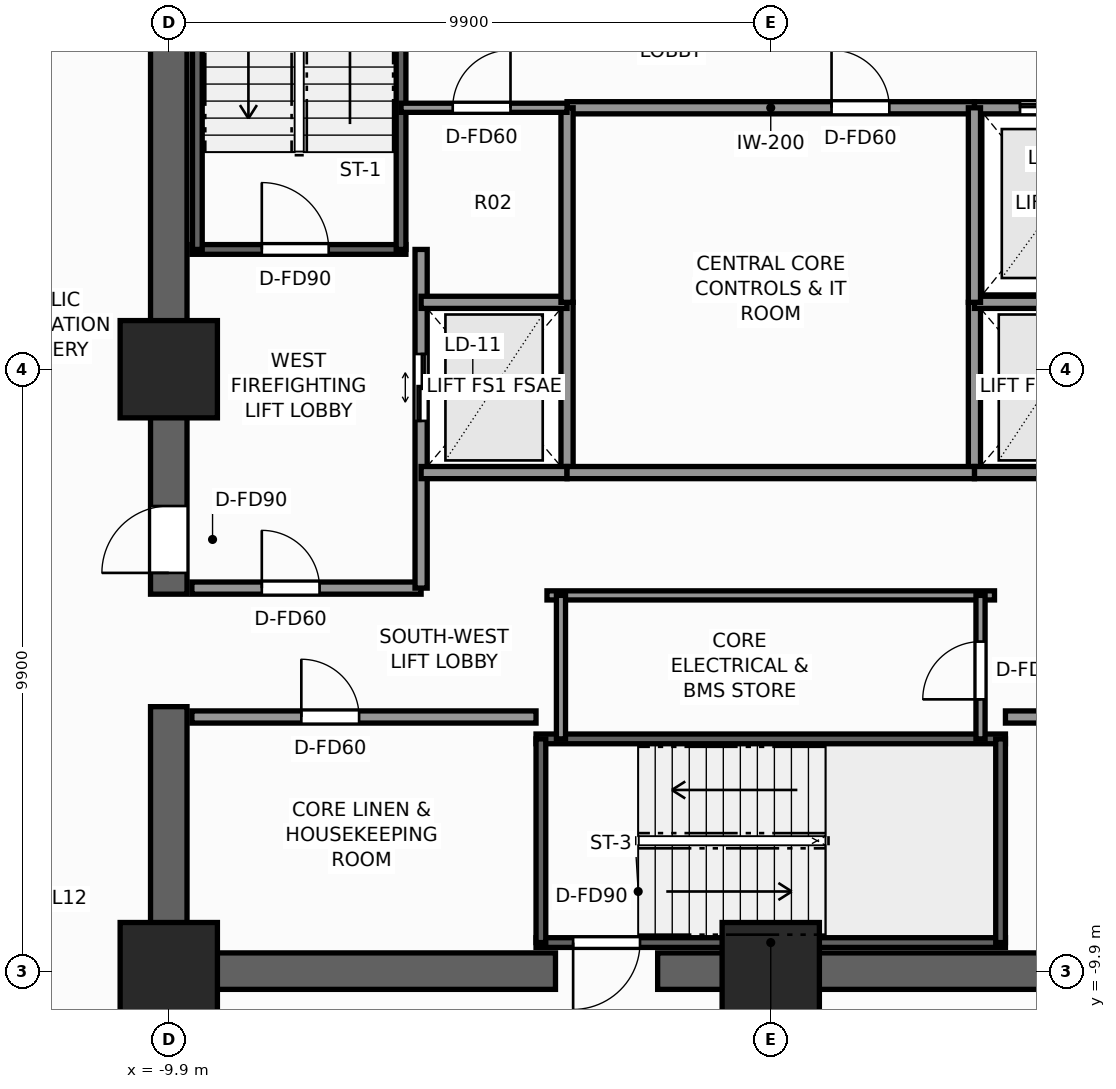
"""IFC4 building model, lengths in metres.
Left out: names, types, materials, properties, quantities, classifications, styles, units other than length and angle.
Written with IfcOpenShell. Run it as: python <this file> out.ifc"""

import sys

from ifc_helpers import new_model, si_unit, direction, frame, frame_2d, origin, origin_2d, place, context, subcontext, project, spatial, rectangle, extrude, element, fill, save


model = new_model("IFC4")
c1 = context("Model", 3, precision=1e-05, world=origin(), true_north=direction((0.0, 1.0)))
c2 = subcontext(c1, "Body", "Model", "MODEL_VIEW")
j1 = project(units=[si_unit("LENGTHUNIT", "METRE"), si_unit("PLANEANGLEUNIT", "RADIAN")], contexts=[c1])
p1 = place(None, origin())
s1 = spatial("IfcSite", under=j1, at=p1, CompositionType="ELEMENT")
p2 = place(p1, origin())
s2 = spatial("IfcBuilding", under=s1, at=p2, CompositionType="ELEMENT")
p3 = place(p2, frame((0.0, 0.0, 15.2)))
s3 = spatial("IfcBuildingStorey", under=s2, at=p3, CompositionType="ELEMENT", Elevation=15.2)
p4 = place(p3, frame((10.2, -9.9, 0.0), z_axis=(0.0, 0.0, 1.0), x_axis=(-1.0, 0.0, 0.0)))
e1 = element("IfcWall", 1, at=p4, inside=s3, PredefinedType="SHEAR", context=c2, shape_type="SweptSolid", body=[
    extrude(rectangle(XDim=12.06, YDim=0.6, at=frame_2d((6.03, 0.0))), origin(), (0.0, 0.0, 1.0), 4.1),
])
p5 = place(p3, frame((-3.54, -9.9, 0.0), z_axis=(0.0, 0.0, 1.0), x_axis=(-1.0, 0.0, 0.0)))
e2 = element("IfcWall", 2, at=p5, inside=s3, PredefinedType="SHEAR", context=c2, shape_type="SweptSolid", body=[
    extrude(rectangle(XDim=6.66, YDim=0.6, at=frame_2d((3.33, 0.0))), origin(), (0.0, 0.0, 1.0), 4.1),
])
p6 = place(p3, frame((-9.9, -9.6, 0.0), z_axis=(0.0, 0.0, 1.0), x_axis=(0.0, 1.0, 0.0)))
e3 = element("IfcWall", 3, at=p6, inside=s3, PredefinedType="SHEAR", context=c2, shape_type="SweptSolid", body=[
    extrude(rectangle(XDim=4.05, YDim=0.6, at=frame_2d((2.025, 0.0))), origin(), (0.0, 0.0, 1.0), 4.1),
])
p7 = place(p3, frame((-9.9, -3.7, 0.0), z_axis=(0.0, 0.0, 1.0), x_axis=(0.0, 1.0, 0.0)))
e4 = element("IfcWall", 4, at=p7, inside=s3, PredefinedType="SHEAR", context=c2, shape_type="SweptSolid", body=[
    extrude(rectangle(XDim=13.3, YDim=0.6, at=frame_2d((6.65, 0.0))), origin(), (0.0, 0.0, 1.0), 4.1),
])
p8 = place(p7, frame((0.35, 0.0, 0.0)))
e5 = element("IfcOpeningElement", 5, at=p8, cuts=e4, PredefinedType="OPENING", context=c2, shape_type="SweptSolid", body=[
    extrude(rectangle(XDim=1.1, YDim=2.2, at=frame_2d((0.55, 1.1))), frame((0.0, 0.31, 0.0), z_axis=(0.0, -1.0, 0.0), x_axis=(1.0, 0.0, 0.0)), (0.0, 0.0, 1.0), 0.62),
])
for number, where, z_axis, x_axis in (
    (6, (-9.9, -9.9, 0.0), (0.0, 0.0, 1.0), (1.0, 0.0, 0.0)),
    (7, (0.0, -9.9, 0.0), (0.0, 0.0, 1.0), (1.0, 0.0, 0.0)),
    (8, (-9.9, 0.0, 0.0), (0.0, 0.0, 1.0), (1.0, 0.0, 0.0)),
):
    element("IfcColumn", number, at=place(p3, frame(where, z_axis=z_axis, x_axis=x_axis)), inside=s3, PredefinedType="COLUMN", context=c2, shape_type="SweptSolid", body=[
        extrude(rectangle(XDim=1.6, YDim=1.6, at=origin_2d()), origin(), (0.0, 0.0, 1.0), 4.1),
    ])
p9 = place(p3, frame((-9.52, 1.97, 0.0), z_axis=(0.0, 0.0, 1.0), x_axis=(1.0, 0.0, 0.0)))
e9 = element("IfcWall", 9, at=p9, inside=s3, PredefinedType="SHEAR", context=c2, shape_type="SweptSolid", body=[
    extrude(rectangle(XDim=3.52, YDim=0.16, at=frame_2d((1.76, 0.0))), origin(), (0.0, 0.0, 1.0), 4.1),
])
p10 = place(p9, frame((1.15, 0.0, 0.0)))
e10 = element("IfcOpeningElement", 10, at=p10, cuts=e9, PredefinedType="OPENING", context=c2, shape_type="SweptSolid", body=[
    extrude(rectangle(XDim=1.1, YDim=2.2, at=frame_2d((0.55, 1.1))), frame((0.0, 0.09, 0.0), z_axis=(0.0, -1.0, 0.0), x_axis=(1.0, 0.0, 0.0)), (0.0, 0.0, 1.0), 0.18),
])
for number, where, z_axis, x_axis in (
    (11, (-9.43, 1.97, 0.0), (0.0, 0.0, 1.0), (0.0, 1.0, 0.0)),
    (12, (-6.08, 1.97, 0.0), (0.0, 0.0, 1.0), (0.0, 1.0, 0.0)),
):
    element("IfcWall", number, at=place(p3, frame(where, z_axis=z_axis, x_axis=x_axis)), inside=s3, PredefinedType="SHEAR", context=c2, shape_type="SweptSolid", body=[
        extrude(rectangle(XDim=7.56, YDim=0.16, at=frame_2d((3.78, 0.0))), origin(), (0.0, 0.0, 1.0), 4.1),
    ])
p11 = place(p3, frame((3.86, -9.43, 0.0), z_axis=(0.0, 0.0, 1.0), x_axis=(-1.0, 0.0, 0.0)))
e13 = element("IfcWall", 13, at=p11, inside=s3, PredefinedType="SHEAR", context=c2, shape_type="SweptSolid", body=[
    extrude(rectangle(XDim=7.72, YDim=0.16, at=frame_2d((3.86, 0.0))), origin(), (0.0, 0.0, 1.0), 4.1),
])
p12 = place(p11, frame((6.01, 0.0, 0.0)))
e14 = element("IfcOpeningElement", 14, at=p12, cuts=e13, PredefinedType="OPENING", context=c2, shape_type="SweptSolid", body=[
    extrude(rectangle(XDim=1.1, YDim=2.2, at=frame_2d((0.55, 1.1))), frame((0.0, 0.09, 0.0), z_axis=(0.0, -1.0, 0.0), x_axis=(1.0, 0.0, 0.0)), (0.0, 0.0, 1.0), 0.18),
])
p13 = place(p3, frame((-3.86, -6.08, 0.0), z_axis=(0.0, 0.0, 1.0), x_axis=(1.0, 0.0, 0.0)))
e15 = element("IfcWall", 15, at=p13, inside=s3, PredefinedType="SHEAR", context=c2, shape_type="SweptSolid", body=[
    extrude(rectangle(XDim=7.72, YDim=0.16, at=frame_2d((3.86, 0.0))), origin(), (0.0, 0.0, 1.0), 4.1),
])
for number, where, z_axis, x_axis in (
    (16, (-3.78, -9.43, 0.0), (0.0, 0.0, 1.0), (0.0, 1.0, 0.0)),
    (17, (3.78, -9.43, 0.0), (0.0, 0.0, 1.0), (0.0, 1.0, 0.0)),
):
    element("IfcWall", number, at=place(p3, frame(where, z_axis=z_axis, x_axis=x_axis)), inside=s3, PredefinedType="SHEAR", context=c2, shape_type="SweptSolid", body=[
        extrude(rectangle(XDim=3.35, YDim=0.16, at=frame_2d((1.675, 0.0))), origin(), (0.0, 0.0, 1.0), 4.1),
    ])
p14 = place(p3, frame((-9.52, -3.6, 0.0), z_axis=(0.0, 0.0, 1.0), x_axis=(1.0, 0.0, 0.0)))
e18 = element("IfcWall", 18, at=p14, inside=s3, PredefinedType="SOLIDWALL", context=c2, shape_type="SweptSolid", body=[
    extrude(rectangle(XDim=3.77, YDim=0.2, at=frame_2d((1.885, 0.0))), origin(), (0.0, 0.0, 1.0), 3.7),
])
p15 = place(p14, frame((1.15, 0.0, 0.0)))
e19 = element("IfcOpeningElement", 19, at=p15, cuts=e18, PredefinedType="OPENING", context=c2, shape_type="SweptSolid", body=[
    extrude(rectangle(XDim=0.95, YDim=2.06, at=frame_2d((0.475, 1.03))), frame((0.0, 0.11, 0.0), z_axis=(0.0, -1.0, 0.0), x_axis=(1.0, 0.0, 0.0)), (0.0, 0.0, 1.0), 0.22),
])
p16 = place(p3, frame((-5.75, -3.6, 0.0), z_axis=(0.0, 0.0, 1.0), x_axis=(0.0, 1.0, 0.0)))
e20 = element("IfcWall", 20, at=p16, inside=s3, PredefinedType="SOLIDWALL", context=c2, shape_type="SweptSolid", body=[
    extrude(rectangle(XDim=5.57, YDim=0.2, at=frame_2d((2.785, 0.0))), origin(), (0.0, 0.0, 1.0), 3.7),
])
p17 = place(p16, frame((2.75, 0.0, 0.0)))
e21 = element("IfcOpeningElement", 21, at=p17, cuts=e20, PredefinedType="OPENING", context=c2, shape_type="SweptSolid", body=[
    extrude(rectangle(XDim=1.1, YDim=2.2, at=frame_2d((0.55, 1.1))), frame((0.0, 0.11, 0.0), z_axis=(0.0, -1.0, 0.0), x_axis=(1.0, 0.0, 0.0)), (0.0, 0.0, 1.0), 0.22),
])
p18 = place(p3, frame((-3.35, -1.7, 0.0), z_axis=(0.0, 0.0, 1.0), x_axis=(0.0, 1.0, 0.0)))
e22 = element("IfcWall", 22, at=p18, inside=s3, PredefinedType="SOLIDWALL", context=c2, shape_type="SweptSolid", body=[
    extrude(rectangle(XDim=2.8, YDim=0.2, at=frame_2d((1.4, 0.0))), origin(), (0.0, 0.0, 1.0), 3.7),
])
for number, where, z_axis, x_axis in (
    (23, (-5.75, -1.7, 0.0), (0.0, 0.0, 1.0), (1.0, 0.0, 0.0)),
    (24, (-5.75, 1.1, 0.0), (0.0, 0.0, 1.0), (1.0, 0.0, 0.0)),
):
    element("IfcWall", number, at=place(p3, frame(where, z_axis=z_axis, x_axis=x_axis)), inside=s3, PredefinedType="SOLIDWALL", context=c2, shape_type="SweptSolid", body=[
        extrude(rectangle(XDim=2.4, YDim=0.2, at=frame_2d((1.2, 0.0))), origin(), (0.0, 0.0, 1.0), 3.7),
    ])
p19 = place(p3, frame((3.35, -1.7, 0.0), z_axis=(0.0, 0.0, 1.0), x_axis=(0.0, 1.0, 0.0)))
e25 = element("IfcWall", 25, at=p19, inside=s3, PredefinedType="SOLIDWALL", context=c2, shape_type="SweptSolid", body=[
    extrude(rectangle(XDim=2.8, YDim=0.2, at=frame_2d((1.4, 0.0))), origin(), (0.0, 0.0, 1.0), 3.7),
])
for number, where, z_axis, x_axis in (
    (26, (3.35, -1.7, 0.0), (0.0, 0.0, 1.0), (1.0, 0.0, 0.0)),
    (27, (3.35, 1.1, 0.0), (0.0, 0.0, 1.0), (1.0, 0.0, 0.0)),
):
    element("IfcWall", number, at=place(p3, frame(where, z_axis=z_axis, x_axis=x_axis)), inside=s3, PredefinedType="SOLIDWALL", context=c2, shape_type="SweptSolid", body=[
        extrude(rectangle(XDim=2.4, YDim=0.2, at=frame_2d((1.2, 0.0))), origin(), (0.0, 0.0, 1.0), 3.7),
    ])
p20 = place(p3, frame((3.35, 4.3, 0.0), z_axis=(0.0, 0.0, 1.0), x_axis=(1.0, 0.0, 0.0)))
e28 = element("IfcWall", 28, at=p20, inside=s3, PredefinedType="SOLIDWALL", context=c2, shape_type="SweptSolid", body=[
    extrude(rectangle(XDim=2.73, YDim=0.2, at=frame_2d((1.365, 0.0))), origin(), (0.0, 0.0, 1.0), 3.7),
])
p21 = place(p20, frame((0.75, 0.0, 0.0)))
e29 = element("IfcOpeningElement", 29, at=p21, cuts=e28, PredefinedType="OPENING", context=c2, shape_type="SweptSolid", body=[
    extrude(rectangle(XDim=1.2, YDim=2.25, at=frame_2d((0.6, 1.125))), frame((0.0, 0.11, 0.0), z_axis=(0.0, -1.0, 0.0), x_axis=(1.0, 0.0, 0.0)), (0.0, 0.0, 1.0), 0.22),
])
p22 = place(p3, frame((-9.52, -5.72, 0.0), z_axis=(0.0, 0.0, 1.0), x_axis=(1.0, 0.0, 0.0)))
e30 = element("IfcWall", 30, at=p22, inside=s3, PredefinedType="SOLIDWALL", context=c2, shape_type="SweptSolid", body=[
    extrude(rectangle(XDim=5.66, YDim=0.2, at=frame_2d((2.83, 0.0))), origin(), (0.0, 0.0, 1.0), 3.7),
])
p23 = place(p22, frame((1.8, 0.0, 0.0)))
e31 = element("IfcOpeningElement", 31, at=p23, cuts=e30, PredefinedType="OPENING", context=c2, shape_type="SweptSolid", body=[
    extrude(rectangle(XDim=0.95, YDim=2.06, at=frame_2d((0.475, 1.03))), frame((0.0, 0.11, 0.0), z_axis=(0.0, -1.0, 0.0), x_axis=(1.0, 0.0, 0.0)), (0.0, 0.0, 1.0), 0.22),
])
p24 = place(p3, frame((3.86, -5.72, 0.0), z_axis=(0.0, 0.0, 1.0), x_axis=(1.0, 0.0, 0.0)))
e32 = element("IfcWall", 32, at=p24, inside=s3, PredefinedType="SOLIDWALL", context=c2, shape_type="SweptSolid", body=[
    extrude(rectangle(XDim=5.66, YDim=0.2, at=frame_2d((2.83, 0.0))), origin(), (0.0, 0.0, 1.0), 3.7),
])
p25 = place(p24, frame((1.8, 0.0, 0.0)))
e33 = element("IfcOpeningElement", 33, at=p25, cuts=e32, PredefinedType="OPENING", context=c2, shape_type="SweptSolid", body=[
    extrude(rectangle(XDim=0.95, YDim=2.06, at=frame_2d((0.475, 1.03))), frame((0.0, 0.11, 0.0), z_axis=(0.0, -1.0, 0.0), x_axis=(1.0, 0.0, 0.0)), (0.0, 0.0, 1.0), 0.22),
])
p26 = place(p3, frame((-3.35, 4.3, 0.0), z_axis=(0.0, 0.0, 1.0), x_axis=(1.0, 0.0, 0.0)))
e34 = element("IfcWall", 34, at=p26, inside=s3, PredefinedType="SOLIDWALL", context=c2, shape_type="SweptSolid", body=[
    extrude(rectangle(XDim=6.7, YDim=0.2, at=frame_2d((3.35, 0.0))), origin(), (0.0, 0.0, 1.0), 3.7),
])
p27 = place(p26, frame((4.35, 0.0, 0.0)))
e35 = element("IfcOpeningElement", 35, at=p27, cuts=e34, PredefinedType="OPENING", context=c2, shape_type="SweptSolid", body=[
    extrude(rectangle(XDim=0.95, YDim=2.06, at=frame_2d((0.475, 1.03))), frame((0.0, 0.11, 0.0), z_axis=(0.0, -1.0, 0.0), x_axis=(1.0, 0.0, 0.0)), (0.0, 0.0, 1.0), 0.22),
])
p28 = place(p3, frame((-3.35, -1.7, 0.0), z_axis=(0.0, 0.0, 1.0), x_axis=(1.0, 0.0, 0.0)))
e36 = element("IfcWall", 36, at=p28, inside=s3, PredefinedType="SOLIDWALL", context=c2, shape_type="SweptSolid", body=[
    extrude(rectangle(XDim=6.7, YDim=0.2, at=frame_2d((3.35, 0.0))), origin(), (0.0, 0.0, 1.0), 3.7),
])
for number, where, z_axis, x_axis in (
    (37, (-3.35, 1.1, 0.0), (0.0, 0.0, 1.0), (0.0, 1.0, 0.0)),
    (38, (3.35, 1.1, 0.0), (0.0, 0.0, 1.0), (0.0, 1.0, 0.0)),
):
    element("IfcWall", number, at=place(p3, frame(where, z_axis=z_axis, x_axis=x_axis)), inside=s3, PredefinedType="SOLIDWALL", context=c2, shape_type="SweptSolid", body=[
        extrude(rectangle(XDim=3.2, YDim=0.2, at=frame_2d((1.6, 0.0))), origin(), (0.0, 0.0, 1.0), 3.7),
    ])
p29 = place(p3, frame((-3.68, -3.72, 0.0), z_axis=(0.0, 0.0, 1.0), x_axis=(1.0, 0.0, 0.0)))
e39 = element("IfcWall", 39, at=p29, inside=s3, PredefinedType="PARTITIONING", context=c2, shape_type="SweptSolid", body=[
    extrude(rectangle(XDim=7.36, YDim=0.15, at=frame_2d((3.68, 0.0))), origin(), (0.0, 0.0, 1.0), 3.7),
])
p30 = place(p3, frame((3.45, -6.08, 0.0), z_axis=(0.0, 0.0, 1.0), x_axis=(0.0, 1.0, 0.0)))
e40 = element("IfcWall", 40, at=p30, inside=s3, PredefinedType="PARTITIONING", context=c2, shape_type="SweptSolid", body=[
    extrude(rectangle(XDim=2.36, YDim=0.15, at=frame_2d((1.18, 0.0))), origin(), (0.0, 0.0, 1.0), 3.7),
])
p31 = place(p30, frame((0.65, 0.0, 0.0)))
e41 = element("IfcOpeningElement", 41, at=p31, cuts=e40, PredefinedType="OPENING", context=c2, shape_type="SweptSolid", body=[
    extrude(rectangle(XDim=0.95, YDim=2.06, at=frame_2d((0.475, 1.03))), frame((0.0, 0.085, 0.0), z_axis=(0.0, -1.0, 0.0), x_axis=(1.0, 0.0, 0.0)), (0.0, 0.0, 1.0), 0.17),
])
p32 = place(p3, frame((-3.45, -6.08, 0.0), z_axis=(0.0, 0.0, 1.0), x_axis=(0.0, 1.0, 0.0)))
e42 = element("IfcWall", 42, at=p32, inside=s3, PredefinedType="PARTITIONING", context=c2, shape_type="SweptSolid", body=[
    extrude(rectangle(XDim=2.36, YDim=0.15, at=frame_2d((1.18, 0.0))), origin(), (0.0, 0.0, 1.0), 3.7),
])
p33 = place(p3, frame((-6.08, 4.3, 0.0), z_axis=(0.0, 0.0, 1.0), x_axis=(1.0, 0.0, 0.0)))
e43 = element("IfcWall", 43, at=p33, inside=s3, PredefinedType="PARTITIONING", context=c2, shape_type="SweptSolid", body=[
    extrude(rectangle(XDim=2.73, YDim=0.15, at=frame_2d((1.365, 0.0))), origin(), (0.0, 0.0, 1.0), 3.7),
])
p34 = place(p33, frame((0.85, 0.0, 0.0)))
e44 = element("IfcOpeningElement", 44, at=p34, cuts=e43, PredefinedType="OPENING", context=c2, shape_type="SweptSolid", body=[
    extrude(rectangle(XDim=0.95, YDim=2.06, at=frame_2d((0.475, 1.03))), frame((0.0, 0.085, 0.0), z_axis=(0.0, -1.0, 0.0), x_axis=(1.0, 0.0, 0.0)), (0.0, 0.0, 1.0), 0.17),
])
p35 = place(p10, origin())
e45 = element("IfcDoor", 45, at=p35, inside=s3, OperationType="SINGLE_SWING_LEFT", PredefinedType="DOOR", context=c2, shape_type="SweptSolid", body=[
    extrude(rectangle(XDim=1.1, YDim=2.2, at=frame_2d((0.55, 1.1))), frame((0.0, 0.025, 0.0), z_axis=(0.0, -1.0, 0.0), x_axis=(1.0, 0.0, 0.0)), (0.0, 0.0, 1.0), 0.05),
])
fill(e10, e45)
p36 = place(p12, origin())
e46 = element("IfcDoor", 46, at=p36, inside=s3, OperationType="SINGLE_SWING_RIGHT", PredefinedType="DOOR", context=c2, shape_type="SweptSolid", body=[
    extrude(rectangle(XDim=1.1, YDim=2.2, at=frame_2d((0.55, 1.1))), frame((0.0, 0.025, 0.0), z_axis=(0.0, -1.0, 0.0), x_axis=(1.0, 0.0, 0.0)), (0.0, 0.0, 1.0), 0.05),
])
fill(e14, e46)
p37 = place(p8, origin())
e47 = element("IfcDoor", 47, at=p37, inside=s3, OperationType="SINGLE_SWING_LEFT", PredefinedType="DOOR", context=c2, shape_type="SweptSolid", body=[
    extrude(rectangle(XDim=1.1, YDim=2.2, at=frame_2d((0.55, 1.1))), frame((0.0, 0.025, 0.0), z_axis=(0.0, -1.0, 0.0), x_axis=(1.0, 0.0, 0.0)), (0.0, 0.0, 1.0), 0.05),
])
fill(e5, e47)
p38 = place(p17, origin())
e48 = element("IfcDoor", 48, at=p38, inside=s3, OperationType="DOUBLE_DOOR_SLIDING", PredefinedType="DOOR", context=c2, shape_type="SweptSolid", body=[
    extrude(rectangle(XDim=1.1, YDim=2.2, at=frame_2d((0.55, 1.1))), frame((0.0, 0.025, 0.0), z_axis=(0.0, -1.0, 0.0), x_axis=(1.0, 0.0, 0.0)), (0.0, 0.0, 1.0), 0.05),
])
fill(e21, e48)
p39 = place(p21, origin())
e49 = element("IfcDoor", 49, at=p39, inside=s3, OperationType="DOUBLE_DOOR_SLIDING", PredefinedType="DOOR", context=c2, shape_type="SweptSolid", body=[
    extrude(rectangle(XDim=1.2, YDim=2.25, at=frame_2d((0.6, 1.125))), frame((0.0, 0.025, 0.0), z_axis=(0.0, -1.0, 0.0), x_axis=(1.0, 0.0, 0.0)), (0.0, 0.0, 1.0), 0.05),
])
fill(e29, e49)
p40 = place(p23, origin())
e50 = element("IfcDoor", 50, at=p40, inside=s3, OperationType="SINGLE_SWING_LEFT", PredefinedType="DOOR", context=c2, shape_type="SweptSolid", body=[
    extrude(rectangle(XDim=0.95, YDim=2.06, at=frame_2d((0.475, 1.03))), frame((0.0, 0.025, 0.0), z_axis=(0.0, -1.0, 0.0), x_axis=(1.0, 0.0, 0.0)), (0.0, 0.0, 1.0), 0.05),
])
fill(e31, e50)
p41 = place(p15, origin())
e51 = element("IfcDoor", 51, at=p41, inside=s3, OperationType="SINGLE_SWING_LEFT", PredefinedType="DOOR", context=c2, shape_type="SweptSolid", body=[
    extrude(rectangle(XDim=0.95, YDim=2.06, at=frame_2d((0.475, 1.03))), frame((0.0, 0.025, 0.0), z_axis=(0.0, -1.0, 0.0), x_axis=(1.0, 0.0, 0.0)), (0.0, 0.0, 1.0), 0.05),
])
fill(e19, e51)
p42 = place(p27, origin())
e52 = element("IfcDoor", 52, at=p42, inside=s3, OperationType="SINGLE_SWING_LEFT", PredefinedType="DOOR", context=c2, shape_type="SweptSolid", body=[
    extrude(rectangle(XDim=0.95, YDim=2.06, at=frame_2d((0.475, 1.03))), frame((0.0, 0.025, 0.0), z_axis=(0.0, -1.0, 0.0), x_axis=(1.0, 0.0, 0.0)), (0.0, 0.0, 1.0), 0.05),
])
fill(e35, e52)
p43 = place(p31, origin())
e53 = element("IfcDoor", 53, at=p43, inside=s3, OperationType="SINGLE_SWING_LEFT", PredefinedType="DOOR", context=c2, shape_type="SweptSolid", body=[
    extrude(rectangle(XDim=0.95, YDim=2.06, at=frame_2d((0.475, 1.03))), frame((0.0, 0.025, 0.0), z_axis=(0.0, -1.0, 0.0), x_axis=(1.0, 0.0, 0.0)), (0.0, 0.0, 1.0), 0.05),
])
fill(e41, e53)
p44 = place(p34, origin())
e54 = element("IfcDoor", 54, at=p44, inside=s3, OperationType="SINGLE_SWING_RIGHT", PredefinedType="DOOR", context=c2, shape_type="SweptSolid", body=[
    extrude(rectangle(XDim=0.95, YDim=2.06, at=frame_2d((0.475, 1.03))), frame((0.0, 0.025, 0.0), z_axis=(0.0, -1.0, 0.0), x_axis=(1.0, 0.0, 0.0)), (0.0, 0.0, 1.0), 0.05),
])
fill(e44, e54)
save(model, sys.argv[1])
